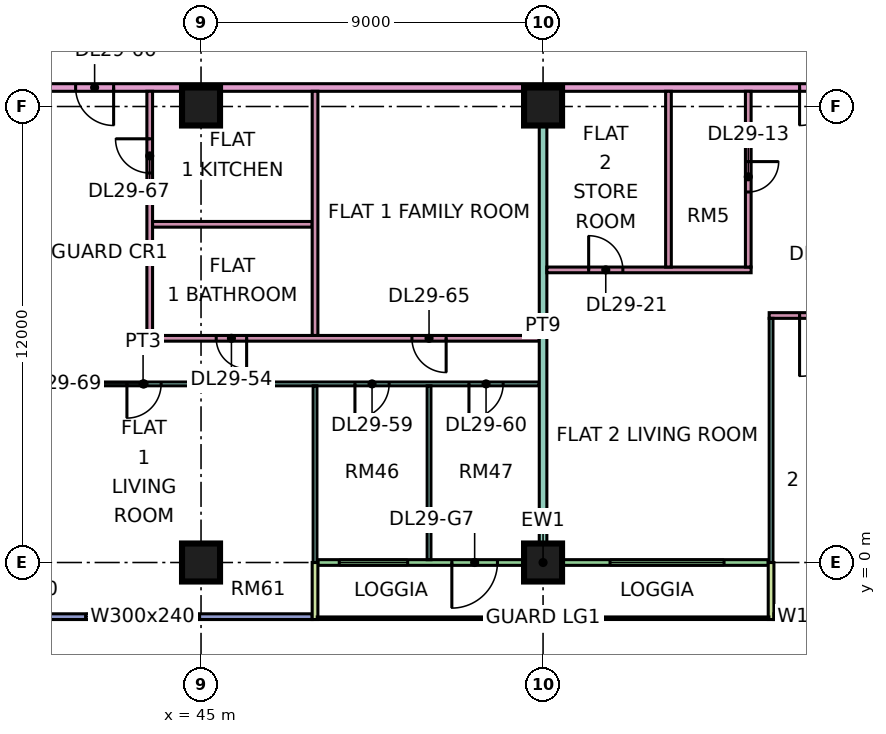
"""IFC4 building model, lengths in metres.
Left out: names, types, materials, properties, quantities, classifications, styles, units other than length and angle.
Written with IfcOpenShell. Run it as: python <this file> out.ifc"""

import sys

from ifc_helpers import new_model, si_unit, direction, frame, frame_2d, origin, origin_2d, place, context, subcontext, project, spatial, rectangle, extrude, element, fill, save


model = new_model("IFC4")
c1 = context("Model", 3, precision=1e-05, world=origin(), true_north=direction((0.0, 1.0)))
c2 = subcontext(c1, "Body", "Model", "MODEL_VIEW")
j1 = project(units=[si_unit("LENGTHUNIT", "METRE"), si_unit("PLANEANGLEUNIT", "RADIAN")], contexts=[c1])
p1 = place(None, origin())
s1 = spatial("IfcSite", under=j1, at=p1, CompositionType="ELEMENT")
p2 = place(p1, origin())
s2 = spatial("IfcBuilding", under=s1, at=p2, CompositionType="ELEMENT")
p3 = place(p2, frame((0.0, 0.0, 125.65)))
s3 = spatial("IfcBuildingStorey", under=s2, at=p3, CompositionType="ELEMENT", Elevation=125.65)
for number, where, z_axis, x_axis in (
    (1, (45.0, 0.0, 0.0), (0.0, 0.0, 1.0), (1.0, 0.0, 0.0)),
    (2, (45.0, 12.0, 0.0), (0.0, 0.0, 1.0), (1.0, 0.0, 0.0)),
    (3, (54.0, 0.0, 0.0), (0.0, 0.0, 1.0), (1.0, 0.0, 0.0)),
    (4, (54.0, 12.0, 0.0), (0.0, 0.0, 1.0), (1.0, 0.0, 0.0)),
):
    element("IfcColumn", number, at=place(p3, frame(where, z_axis=z_axis, x_axis=x_axis)), inside=s3, PredefinedType="COLUMN", context=c2, shape_type="SweptSolid", body=[
        extrude(rectangle(XDim=1.0, YDim=1.0, at=origin_2d()), origin(), (0.0, 0.0, 1.0), 3.75),
    ])
p4 = place(p3, frame((36.075, -1.425, 0.0), z_axis=(0.0, 0.0, 1.0), x_axis=(1.0, 0.0, 0.0)))
e5 = element("IfcWall", 5, at=p4, inside=s3, PredefinedType="SOLIDWALL", context=c2, shape_type="SweptSolid", body=[
    extrude(rectangle(XDim=11.85, YDim=0.15, at=frame_2d((5.925, 0.0))), origin(), (0.0, 0.0, 1.0), 3.35),
])
p5 = place(p4, frame((0.562, 0.0, 0.45)))
e6 = element("IfcOpeningElement", 6, at=p5, cuts=e5, PredefinedType="OPENING", context=c2, shape_type="SweptSolid", body=[
    extrude(rectangle(XDim=1.8, YDim=2.4, at=frame_2d((0.9, 1.2))), frame((0.0, 0.085, 0.0), z_axis=(0.0, -1.0, 0.0), x_axis=(1.0, 0.0, 0.0)), (0.0, 0.0, 1.0), 0.17),
])
p6 = place(p4, frame((5.887, 0.0, 0.45)))
e7 = element("IfcOpeningElement", 7, at=p6, cuts=e5, PredefinedType="OPENING", context=c2, shape_type="SweptSolid", body=[
    extrude(rectangle(XDim=3.0, YDim=2.4, at=frame_2d((1.5, 1.2))), frame((0.0, 0.085, 0.0), z_axis=(0.0, -1.0, 0.0), x_axis=(1.0, 0.0, 0.0)), (0.0, 0.0, 1.0), 0.17),
])
p7 = place(p3, frame((48.075, 0.0, 0.0), z_axis=(0.0, 0.0, 1.0), x_axis=(1.0, 0.0, 0.0)))
e8 = element("IfcWall", 8, at=p7, inside=s3, PredefinedType="SOLIDWALL", context=c2, shape_type="SweptSolid", body=[
    extrude(rectangle(XDim=11.85, YDim=0.15, at=frame_2d((5.925, 0.0))), origin(), (0.0, 0.0, 1.0), 3.35),
])
p8 = place(p7, frame((0.562, 0.0, 0.45)))
e9 = element("IfcOpeningElement", 9, at=p8, cuts=e8, PredefinedType="OPENING", context=c2, shape_type="SweptSolid", body=[
    extrude(rectangle(XDim=1.8, YDim=2.4, at=frame_2d((0.9, 1.2))), frame((0.0, 0.085, 0.0), z_axis=(0.0, -1.0, 0.0), x_axis=(1.0, 0.0, 0.0)), (0.0, 0.0, 1.0), 0.17),
])
p9 = place(p7, frame((3.525, 0.0, 0.0)))
e10 = element("IfcOpeningElement", 10, at=p9, cuts=e8, PredefinedType="OPENING", context=c2, shape_type="SweptSolid", body=[
    extrude(rectangle(XDim=1.2, YDim=2.4, at=frame_2d((0.6, 1.2))), frame((0.0, 0.085, 0.0), z_axis=(0.0, -1.0, 0.0), x_axis=(1.0, 0.0, 0.0)), (0.0, 0.0, 1.0), 0.17),
])
p10 = place(p7, frame((7.688, 0.0, 0.45)))
e11 = element("IfcOpeningElement", 11, at=p10, cuts=e8, PredefinedType="OPENING", context=c2, shape_type="SweptSolid", body=[
    extrude(rectangle(XDim=3.0, YDim=2.4, at=frame_2d((1.5, 1.2))), frame((0.0, 0.085, 0.0), z_axis=(0.0, -1.0, 0.0), x_axis=(1.0, 0.0, 0.0)), (0.0, 0.0, 1.0), 0.17),
])
for number, where, z_axis, x_axis in (
    (12, (48.0, -1.5, 0.0), (0.0, 0.0, 1.0), (0.0, 1.0, 0.0)),
    (13, (60.0, -1.5, 0.0), (0.0, 0.0, 1.0), (0.0, 1.0, 0.0)),
):
    element("IfcWall", number, at=place(p3, frame(where, z_axis=z_axis, x_axis=x_axis)), inside=s3, PredefinedType="SOLIDWALL", context=c2, shape_type="SweptSolid", body=[
        extrude(rectangle(XDim=1.5, YDim=0.15, at=frame_2d((0.75, 0.0))), origin(), (0.0, 0.0, 1.0), 3.35),
    ])
p11 = place(p3, frame((60.075, -1.425, 0.0), z_axis=(0.0, 0.0, 1.0), x_axis=(1.0, 0.0, 0.0)))
e14 = element("IfcWall", 14, at=p11, inside=s3, PredefinedType="SOLIDWALL", context=c2, shape_type="SweptSolid", body=[
    extrude(rectangle(XDim=10.425, YDim=0.15, at=frame_2d((5.212, 0.0))), origin(), (0.0, 0.0, 1.0), 3.35),
])
p12 = place(p11, frame((0.562, 0.0, 0.45)))
e15 = element("IfcOpeningElement", 15, at=p12, cuts=e14, PredefinedType="OPENING", context=c2, shape_type="SweptSolid", body=[
    extrude(rectangle(XDim=1.8, YDim=2.4, at=frame_2d((0.9, 1.2))), frame((0.0, 0.085, 0.0), z_axis=(0.0, -1.0, 0.0), x_axis=(1.0, 0.0, 0.0)), (0.0, 0.0, 1.0), 0.17),
])
p13 = place(p11, frame((3.525, 0.0, 0.45)))
e16 = element("IfcOpeningElement", 16, at=p13, cuts=e14, PredefinedType="OPENING", context=c2, shape_type="SweptSolid", body=[
    extrude(rectangle(XDim=1.8, YDim=2.4, at=frame_2d((0.9, 1.2))), frame((0.0, 0.085, 0.0), z_axis=(0.0, -1.0, 0.0), x_axis=(1.0, 0.0, 0.0)), (0.0, 0.0, 1.0), 0.17),
])
p14 = place(p11, frame((6.675, 0.0, 0.45)))
e17 = element("IfcOpeningElement", 17, at=p14, cuts=e14, PredefinedType="OPENING", context=c2, shape_type="SweptSolid", body=[
    extrude(rectangle(XDim=3.0, YDim=2.4, at=frame_2d((1.5, 1.2))), frame((0.0, 0.085, 0.0), z_axis=(0.0, -1.0, 0.0), x_axis=(1.0, 0.0, 0.0)), (0.0, 0.0, 1.0), 0.17),
])
p15 = place(p3, frame((33.05, 4.7, 0.0), z_axis=(0.0, 0.0, 1.0), x_axis=(1.0, 0.0, 0.0)))
e18 = element("IfcWall", 18, at=p15, inside=s3, PredefinedType="PARTITIONING", context=c2, shape_type="SweptSolid", body=[
    extrude(rectangle(XDim=20.85, YDim=0.1, at=frame_2d((10.425, 0.0))), origin(), (0.0, 0.0, 1.0), 3.35),
])
p16 = place(p15, frame((1.0, 0.0, 0.0)))
e19 = element("IfcOpeningElement", 19, at=p16, cuts=e18, PredefinedType="OPENING", context=c2, shape_type="SweptSolid", body=[
    extrude(rectangle(XDim=0.9, YDim=2.1, at=frame_2d((0.45, 1.05))), frame((0.0, 0.06, 0.0), z_axis=(0.0, -1.0, 0.0), x_axis=(1.0, 0.0, 0.0)), (0.0, 0.0, 1.0), 0.12),
])
p17 = place(p15, frame((4.0, 0.0, 0.0)))
e20 = element("IfcOpeningElement", 20, at=p17, cuts=e18, PredefinedType="OPENING", context=c2, shape_type="SweptSolid", body=[
    extrude(rectangle(XDim=0.9, YDim=2.1, at=frame_2d((0.45, 1.05))), frame((0.0, 0.06, 0.0), z_axis=(0.0, -1.0, 0.0), x_axis=(1.0, 0.0, 0.0)), (0.0, 0.0, 1.0), 0.12),
])
p18 = place(p15, frame((16.0, 0.0, 0.0)))
e21 = element("IfcOpeningElement", 21, at=p18, cuts=e18, PredefinedType="OPENING", context=c2, shape_type="SweptSolid", body=[
    extrude(rectangle(XDim=0.9, YDim=2.1, at=frame_2d((0.45, 1.05))), frame((0.0, 0.06, 0.0), z_axis=(0.0, -1.0, 0.0), x_axis=(1.0, 0.0, 0.0)), (0.0, 0.0, 1.0), 0.12),
])
p19 = place(p15, frame((19.0, 0.0, 0.0)))
e22 = element("IfcOpeningElement", 22, at=p19, cuts=e18, PredefinedType="OPENING", context=c2, shape_type="SweptSolid", body=[
    extrude(rectangle(XDim=0.9, YDim=2.1, at=frame_2d((0.45, 1.05))), frame((0.0, 0.06, 0.0), z_axis=(0.0, -1.0, 0.0), x_axis=(1.0, 0.0, 0.0)), (0.0, 0.0, 1.0), 0.12),
])
p20 = place(p15, frame((10.0, 0.0, 0.0)))
e23 = element("IfcOpeningElement", 23, at=p20, cuts=e18, PredefinedType="OPENING", context=c2, shape_type="SweptSolid", body=[
    extrude(rectangle(XDim=0.9, YDim=2.1, at=frame_2d((0.45, 1.05))), frame((0.0, 0.06, 0.0), z_axis=(0.0, -1.0, 0.0), x_axis=(1.0, 0.0, 0.0)), (0.0, 0.0, 1.0), 0.12),
])
p21 = place(p3, frame((40.65, 12.5, 0.0), z_axis=(0.0, 0.0, 1.0), x_axis=(1.0, 0.0, 0.0)))
e24 = element("IfcWall", 24, at=p21, inside=s3, PredefinedType="PARTITIONING", context=c2, shape_type="SweptSolid", body=[
    extrude(rectangle(XDim=31.35, YDim=0.2, at=frame_2d((15.675, 0.0))), origin(), (0.0, 0.0, 1.0), 3.35),
])
p22 = place(p21, frame((20.1, 0.0, 0.0)))
e25 = element("IfcOpeningElement", 25, at=p22, cuts=e24, PredefinedType="OPENING", context=c2, shape_type="SweptSolid", body=[
    extrude(rectangle(XDim=1.0, YDim=2.1, at=frame_2d((0.5, 1.05))), frame((0.0, 0.11, 0.0), z_axis=(0.0, -1.0, 0.0), x_axis=(1.0, 0.0, 0.0)), (0.0, 0.0, 1.0), 0.22),
])
p23 = place(p21, frame((1.05, 0.0, 0.0)))
e26 = element("IfcOpeningElement", 26, at=p23, cuts=e24, PredefinedType="OPENING", context=c2, shape_type="SweptSolid", body=[
    extrude(rectangle(XDim=1.0, YDim=2.1, at=frame_2d((0.5, 1.05))), frame((0.0, 0.11, 0.0), z_axis=(0.0, -1.0, 0.0), x_axis=(1.0, 0.0, 0.0)), (0.0, 0.0, 1.0), 0.22),
])
p24 = place(p3, frame((43.575, 5.9, 0.0), z_axis=(0.0, 0.0, 1.0), x_axis=(1.0, 0.0, 0.0)))
e27 = element("IfcWall", 27, at=p24, inside=s3, PredefinedType="PARTITIONING", context=c2, shape_type="SweptSolid", body=[
    extrude(rectangle(XDim=10.325, YDim=0.15, at=frame_2d((5.163, 0.0))), origin(), (0.0, 0.0, 1.0), 3.35),
])
p25 = place(p24, frame((1.825, 0.0, 0.0)))
e28 = element("IfcOpeningElement", 28, at=p25, cuts=e27, PredefinedType="OPENING", context=c2, shape_type="SweptSolid", body=[
    extrude(rectangle(XDim=0.8, YDim=2.1, at=frame_2d((0.4, 1.05))), frame((0.0, 0.085, 0.0), z_axis=(0.0, -1.0, 0.0), x_axis=(1.0, 0.0, 0.0)), (0.0, 0.0, 1.0), 0.17),
])
p26 = place(p24, frame((6.975, 0.0, 0.0)))
e29 = element("IfcOpeningElement", 29, at=p26, cuts=e27, PredefinedType="OPENING", context=c2, shape_type="SweptSolid", body=[
    extrude(rectangle(XDim=0.9, YDim=2.1, at=frame_2d((0.45, 1.05))), frame((0.0, 0.085, 0.0), z_axis=(0.0, -1.0, 0.0), x_axis=(1.0, 0.0, 0.0)), (0.0, 0.0, 1.0), 0.17),
])
p27 = place(p3, frame((43.65, 5.975, 0.0), z_axis=(0.0, 0.0, 1.0), x_axis=(0.0, 1.0, 0.0)))
e30 = element("IfcWall", 30, at=p27, inside=s3, PredefinedType="PARTITIONING", context=c2, shape_type="SweptSolid", body=[
    extrude(rectangle(XDim=6.425, YDim=0.15, at=frame_2d((3.212, 0.0))), origin(), (0.0, 0.0, 1.0), 3.35),
])
p28 = place(p27, frame((4.275, 0.0, 0.0)))
e31 = element("IfcOpeningElement", 31, at=p28, cuts=e30, PredefinedType="OPENING", context=c2, shape_type="SweptSolid", body=[
    extrude(rectangle(XDim=0.9, YDim=2.1, at=frame_2d((0.45, 1.05))), frame((0.0, 0.085, 0.0), z_axis=(0.0, -1.0, 0.0), x_axis=(1.0, 0.0, 0.0)), (0.0, 0.0, 1.0), 0.17),
])
p29 = place(p3, frame((43.725, 8.9, 0.0), z_axis=(0.0, 0.0, 1.0), x_axis=(1.0, 0.0, 0.0)))
e32 = element("IfcWall", 32, at=p29, inside=s3, PredefinedType="PARTITIONING", context=c2, shape_type="SweptSolid", body=[
    extrude(rectangle(XDim=4.2, YDim=0.15, at=frame_2d((2.1, 0.0))), origin(), (0.0, 0.0, 1.0), 3.35),
])
p30 = place(p3, frame((48.0, 0.0, 0.0), z_axis=(0.0, 0.0, 1.0), x_axis=(0.0, 1.0, 0.0)))
e33 = element("IfcWall", 33, at=p30, inside=s3, PredefinedType="PARTITIONING", context=c2, shape_type="SweptSolid", body=[
    extrude(rectangle(XDim=4.65, YDim=0.1, at=frame_2d((2.325, 0.0))), origin(), (0.0, 0.0, 1.0), 3.35),
])
p31 = place(p3, frame((48.0, 5.975, 0.0), z_axis=(0.0, 0.0, 1.0), x_axis=(0.0, 1.0, 0.0)))
e34 = element("IfcWall", 34, at=p31, inside=s3, PredefinedType="PARTITIONING", context=c2, shape_type="SweptSolid", body=[
    extrude(rectangle(XDim=6.425, YDim=0.15, at=frame_2d((3.212, 0.0))), origin(), (0.0, 0.0, 1.0), 3.35),
])
p32 = place(p3, frame((51.0, 0.074, 0.0), z_axis=(0.0, 0.0, 1.0), x_axis=(0.0, 1.0, 0.0)))
e35 = element("IfcWall", 35, at=p32, inside=s3, PredefinedType="PARTITIONING", context=c2, shape_type="SweptSolid", body=[
    extrude(rectangle(XDim=4.576, YDim=0.1, at=frame_2d((2.288, 0.0))), origin(), (0.0, 0.0, 1.0), 3.35),
])
p33 = place(p3, frame((54.0, 0.074, 0.0), z_axis=(0.0, 0.0, 1.0), x_axis=(0.0, 1.0, 0.0)))
e36 = element("IfcWall", 36, at=p33, inside=s3, PredefinedType="PARTITIONING", context=c2, shape_type="SweptSolid", body=[
    extrude(rectangle(XDim=12.326, YDim=0.2, at=frame_2d((6.163, 0.0))), origin(), (0.0, 0.0, 1.0), 3.35),
])
p34 = place(p3, frame((54.1, 7.7, 0.0), z_axis=(0.0, 0.0, 1.0), x_axis=(1.0, 0.0, 0.0)))
e37 = element("IfcWall", 37, at=p34, inside=s3, PredefinedType="PARTITIONING", context=c2, shape_type="SweptSolid", body=[
    extrude(rectangle(XDim=5.375, YDim=0.15, at=frame_2d((2.688, 0.0))), origin(), (0.0, 0.0, 1.0), 3.35),
])
p35 = place(p34, frame((1.1, 0.0, 0.0)))
e38 = element("IfcOpeningElement", 38, at=p35, cuts=e37, PredefinedType="OPENING", context=c2, shape_type="SweptSolid", body=[
    extrude(rectangle(XDim=0.9, YDim=2.1, at=frame_2d((0.45, 1.05))), frame((0.0, 0.085, 0.0), z_axis=(0.0, -1.0, 0.0), x_axis=(1.0, 0.0, 0.0)), (0.0, 0.0, 1.0), 0.17),
])
p36 = place(p3, frame((57.3, 7.775, 0.0), z_axis=(0.0, 0.0, 1.0), x_axis=(0.0, 1.0, 0.0)))
e39 = element("IfcWall", 39, at=p36, inside=s3, PredefinedType="PARTITIONING", context=c2, shape_type="SweptSolid", body=[
    extrude(rectangle(XDim=4.625, YDim=0.15, at=frame_2d((2.312, 0.0))), origin(), (0.0, 0.0, 1.0), 3.35),
])
p37 = place(p3, frame((59.4, 7.775, 0.0), z_axis=(0.0, 0.0, 1.0), x_axis=(0.0, 1.0, 0.0)))
e40 = element("IfcWall", 40, at=p37, inside=s3, PredefinedType="PARTITIONING", context=c2, shape_type="SweptSolid", body=[
    extrude(rectangle(XDim=4.625, YDim=0.15, at=frame_2d((2.312, 0.0))), origin(), (0.0, 0.0, 1.0), 3.35),
])
p38 = place(p37, frame((1.975, 0.0, 0.0)))
e41 = element("IfcOpeningElement", 41, at=p38, cuts=e40, PredefinedType="OPENING", context=c2, shape_type="SweptSolid", body=[
    extrude(rectangle(XDim=0.8, YDim=2.1, at=frame_2d((0.4, 1.05))), frame((0.0, 0.085, 0.0), z_axis=(0.0, -1.0, 0.0), x_axis=(1.0, 0.0, 0.0)), (0.0, 0.0, 1.0), 0.17),
])
p39 = place(p3, frame((59.95, 6.5, 0.0), z_axis=(0.0, 0.0, 1.0), x_axis=(1.0, 0.0, 0.0)))
e42 = element("IfcWall", 42, at=p39, inside=s3, PredefinedType="PARTITIONING", context=c2, shape_type="SweptSolid", body=[
    extrude(rectangle(XDim=11.976, YDim=0.15, at=frame_2d((5.988, 0.0))), origin(), (0.0, 0.0, 1.0), 3.35),
])
p40 = place(p39, frame((10.1, 0.0, 0.0)))
e43 = element("IfcOpeningElement", 43, at=p40, cuts=e42, PredefinedType="OPENING", context=c2, shape_type="SweptSolid", body=[
    extrude(rectangle(XDim=0.9, YDim=2.1, at=frame_2d((0.45, 1.05))), frame((0.0, 0.085, 0.0), z_axis=(0.0, -1.0, 0.0), x_axis=(1.0, 0.0, 0.0)), (0.0, 0.0, 1.0), 0.17),
])
p41 = place(p39, frame((4.95, 0.0, 0.0)))
e44 = element("IfcOpeningElement", 44, at=p41, cuts=e42, PredefinedType="OPENING", context=c2, shape_type="SweptSolid", body=[
    extrude(rectangle(XDim=0.8, YDim=2.1, at=frame_2d((0.4, 1.05))), frame((0.0, 0.085, 0.0), z_axis=(0.0, -1.0, 0.0), x_axis=(1.0, 0.0, 0.0)), (0.0, 0.0, 1.0), 0.17),
])
p42 = place(p39, frame((0.8, 0.0, 0.0)))
e45 = element("IfcOpeningElement", 45, at=p42, cuts=e42, PredefinedType="OPENING", context=c2, shape_type="SweptSolid", body=[
    extrude(rectangle(XDim=1.6, YDim=2.1, at=frame_2d((0.8, 1.05))), frame((0.0, 0.085, 0.0), z_axis=(0.0, -1.0, 0.0), x_axis=(1.0, 0.0, 0.0)), (0.0, 0.0, 1.0), 0.17),
])
p43 = place(p3, frame((60.0, 0.0, 0.0), z_axis=(0.0, 0.0, 1.0), x_axis=(0.0, 1.0, 0.0)))
e46 = element("IfcWall", 46, at=p43, inside=s3, PredefinedType="PARTITIONING", context=c2, shape_type="SweptSolid", body=[
    extrude(rectangle(XDim=6.425, YDim=0.1, at=frame_2d((3.212, 0.0))), origin(), (0.0, 0.0, 1.0), 3.35),
])
p44 = place(p6, origin())
e47 = element("IfcWindow", 47, at=p44, inside=s3, PartitioningType="SINGLE_PANEL", PredefinedType="WINDOW", context=c2, shape_type="SweptSolid", body=[
    extrude(rectangle(XDim=3.0, YDim=2.4, at=frame_2d((1.5, 1.2))), frame((0.0, 0.03, 0.0), z_axis=(0.0, -1.0, 0.0), x_axis=(1.0, 0.0, 0.0)), (0.0, 0.0, 1.0), 0.06),
])
fill(e7, e47)
p45 = place(p8, origin())
e48 = element("IfcWindow", 48, at=p45, inside=s3, PartitioningType="SINGLE_PANEL", PredefinedType="WINDOW", context=c2, shape_type="SweptSolid", body=[
    extrude(rectangle(XDim=1.8, YDim=2.4, at=frame_2d((0.9, 1.2))), frame((0.0, 0.03, 0.0), z_axis=(0.0, -1.0, 0.0), x_axis=(1.0, 0.0, 0.0)), (0.0, 0.0, 1.0), 0.06),
])
fill(e9, e48)
p46 = place(p9, frame((1.2, 0.0, 0.0), z_axis=(0.0, 0.0, 1.0), x_axis=(-1.0, 0.0, 0.0)))
e49 = element("IfcDoor", 49, at=p46, inside=s3, OperationType="DOUBLE_DOOR_SINGLE_SWING", PredefinedType="DOOR", context=c2, shape_type="SweptSolid", body=[
    extrude(rectangle(XDim=1.2, YDim=2.4, at=frame_2d((0.6, 1.2))), frame((0.0, 0.025, 0.0), z_axis=(0.0, -1.0, 0.0), x_axis=(1.0, 0.0, 0.0)), (0.0, 0.0, 1.0), 0.05),
])
fill(e10, e49)
p47 = place(p10, origin())
e50 = element("IfcWindow", 50, at=p47, inside=s3, PartitioningType="SINGLE_PANEL", PredefinedType="WINDOW", context=c2, shape_type="SweptSolid", body=[
    extrude(rectangle(XDim=3.0, YDim=2.4, at=frame_2d((1.5, 1.2))), frame((0.0, 0.03, 0.0), z_axis=(0.0, -1.0, 0.0), x_axis=(1.0, 0.0, 0.0)), (0.0, 0.0, 1.0), 0.06),
])
fill(e11, e50)
p48 = place(p12, origin())
e51 = element("IfcWindow", 51, at=p48, inside=s3, PartitioningType="SINGLE_PANEL", PredefinedType="WINDOW", context=c2, shape_type="SweptSolid", body=[
    extrude(rectangle(XDim=1.8, YDim=2.4, at=frame_2d((0.9, 1.2))), frame((0.0, 0.03, 0.0), z_axis=(0.0, -1.0, 0.0), x_axis=(1.0, 0.0, 0.0)), (0.0, 0.0, 1.0), 0.06),
])
fill(e15, e51)
p49 = place(p38, origin())
e52 = element("IfcDoor", 52, at=p49, inside=s3, OperationType="SINGLE_SWING_RIGHT", PredefinedType="DOOR", context=c2, shape_type="SweptSolid", body=[
    extrude(rectangle(XDim=0.8, YDim=2.1, at=frame_2d((0.4, 1.05))), frame((0.0, 0.025, 0.0), z_axis=(0.0, -1.0, 0.0), x_axis=(1.0, 0.0, 0.0)), (0.0, 0.0, 1.0), 0.05),
])
fill(e41, e52)
p50 = place(p22, frame((1.0, 0.0, 0.0), z_axis=(0.0, 0.0, 1.0), x_axis=(-1.0, 0.0, 0.0)))
e53 = element("IfcDoor", 53, at=p50, inside=s3, OperationType="SINGLE_SWING_LEFT", PredefinedType="DOOR", context=c2, shape_type="SweptSolid", body=[
    extrude(rectangle(XDim=1.0, YDim=2.1, at=frame_2d((0.5, 1.05))), frame((0.0, 0.025, 0.0), z_axis=(0.0, -1.0, 0.0), x_axis=(1.0, 0.0, 0.0)), (0.0, 0.0, 1.0), 0.05),
])
fill(e25, e53)
p51 = place(p42, frame((1.6, 0.0, 0.0), z_axis=(0.0, 0.0, 1.0), x_axis=(-1.0, 0.0, 0.0)))
e54 = element("IfcDoor", 54, at=p51, inside=s3, OperationType="DOUBLE_DOOR_SINGLE_SWING", PredefinedType="DOOR", context=c2, shape_type="SweptSolid", body=[
    extrude(rectangle(XDim=1.6, YDim=2.1, at=frame_2d((0.8, 1.05))), frame((0.0, 0.025, 0.0), z_axis=(0.0, -1.0, 0.0), x_axis=(1.0, 0.0, 0.0)), (0.0, 0.0, 1.0), 0.05),
])
fill(e45, e54)
p52 = place(p35, origin())
e55 = element("IfcDoor", 55, at=p52, inside=s3, OperationType="SINGLE_SWING_LEFT", PredefinedType="DOOR", context=c2, shape_type="SweptSolid", body=[
    extrude(rectangle(XDim=0.9, YDim=2.1, at=frame_2d((0.45, 1.05))), frame((0.0, 0.025, 0.0), z_axis=(0.0, -1.0, 0.0), x_axis=(1.0, 0.0, 0.0)), (0.0, 0.0, 1.0), 0.05),
])
fill(e38, e55)
p53 = place(p25, origin())
e56 = element("IfcDoor", 56, at=p53, inside=s3, OperationType="SINGLE_SWING_RIGHT", PredefinedType="DOOR", context=c2, shape_type="SweptSolid", body=[
    extrude(rectangle(XDim=0.8, YDim=2.1, at=frame_2d((0.4, 1.05))), frame((0.0, 0.025, 0.0), z_axis=(0.0, -1.0, 0.0), x_axis=(1.0, 0.0, 0.0)), (0.0, 0.0, 1.0), 0.05),
])
fill(e28, e56)
p54 = place(p18, frame((0.9, 0.0, 0.0), z_axis=(0.0, 0.0, 1.0), x_axis=(-1.0, 0.0, 0.0)))
e57 = element("IfcDoor", 57, at=p54, inside=s3, OperationType="SINGLE_SWING_LEFT", PredefinedType="DOOR", context=c2, shape_type="SweptSolid", body=[
    extrude(rectangle(XDim=0.9, YDim=2.1, at=frame_2d((0.45, 1.05))), frame((0.0, 0.025, 0.0), z_axis=(0.0, -1.0, 0.0), x_axis=(1.0, 0.0, 0.0)), (0.0, 0.0, 1.0), 0.05),
])
fill(e21, e57)
p55 = place(p19, frame((0.9, 0.0, 0.0), z_axis=(0.0, 0.0, 1.0), x_axis=(-1.0, 0.0, 0.0)))
e58 = element("IfcDoor", 58, at=p55, inside=s3, OperationType="SINGLE_SWING_LEFT", PredefinedType="DOOR", context=c2, shape_type="SweptSolid", body=[
    extrude(rectangle(XDim=0.9, YDim=2.1, at=frame_2d((0.45, 1.05))), frame((0.0, 0.025, 0.0), z_axis=(0.0, -1.0, 0.0), x_axis=(1.0, 0.0, 0.0)), (0.0, 0.0, 1.0), 0.05),
])
fill(e22, e58)
p56 = place(p26, origin())
e59 = element("IfcDoor", 59, at=p56, inside=s3, OperationType="SINGLE_SWING_RIGHT", PredefinedType="DOOR", context=c2, shape_type="SweptSolid", body=[
    extrude(rectangle(XDim=0.9, YDim=2.1, at=frame_2d((0.45, 1.05))), frame((0.0, 0.025, 0.0), z_axis=(0.0, -1.0, 0.0), x_axis=(1.0, 0.0, 0.0)), (0.0, 0.0, 1.0), 0.05),
])
fill(e29, e59)
p57 = place(p23, origin())
e60 = element("IfcDoor", 60, at=p57, inside=s3, OperationType="SINGLE_SWING_RIGHT", PredefinedType="DOOR", context=c2, shape_type="SweptSolid", body=[
    extrude(rectangle(XDim=1.0, YDim=2.1, at=frame_2d((0.5, 1.05))), frame((0.0, 0.025, 0.0), z_axis=(0.0, -1.0, 0.0), x_axis=(1.0, 0.0, 0.0)), (0.0, 0.0, 1.0), 0.05),
])
fill(e26, e60)
p58 = place(p28, frame((0.9, 0.0, 0.0), z_axis=(0.0, 0.0, 1.0), x_axis=(-1.0, 0.0, 0.0)))
e61 = element("IfcDoor", 61, at=p58, inside=s3, OperationType="SINGLE_SWING_RIGHT", PredefinedType="DOOR", context=c2, shape_type="SweptSolid", body=[
    extrude(rectangle(XDim=0.9, YDim=2.1, at=frame_2d((0.45, 1.05))), frame((0.0, 0.025, 0.0), z_axis=(0.0, -1.0, 0.0), x_axis=(1.0, 0.0, 0.0)), (0.0, 0.0, 1.0), 0.05),
])
fill(e31, e61)
p59 = place(p20, frame((0.9, 0.0, 0.0), z_axis=(0.0, 0.0, 1.0), x_axis=(-1.0, 0.0, 0.0)))
e62 = element("IfcDoor", 62, at=p59, inside=s3, OperationType="SINGLE_SWING_LEFT", PredefinedType="DOOR", context=c2, shape_type="SweptSolid", body=[
    extrude(rectangle(XDim=0.9, YDim=2.1, at=frame_2d((0.45, 1.05))), frame((0.0, 0.025, 0.0), z_axis=(0.0, -1.0, 0.0), x_axis=(1.0, 0.0, 0.0)), (0.0, 0.0, 1.0), 0.05),
])
fill(e23, e62)
save(model, sys.argv[1])
